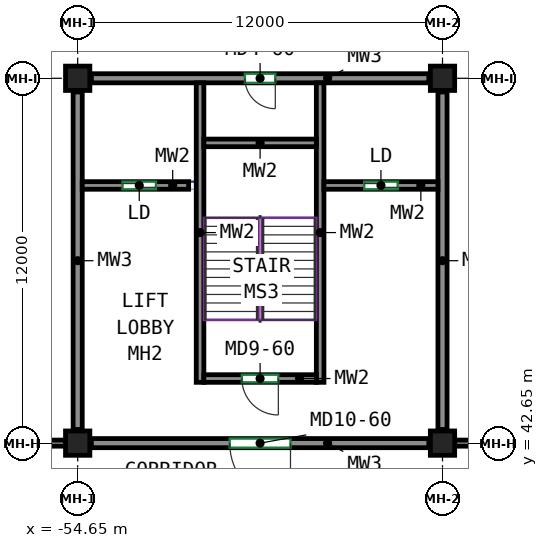
"""IFC4 building model, lengths in metres.
Left out: names, types, materials, properties, quantities, classifications, styles, units other than length and angle.
Written with IfcOpenShell. Run it as: python <this file> out.ifc"""

import sys

from ifc_helpers import new_model, si_unit, direction, frame, frame_2d, origin, origin_2d, place, context, subcontext, project, spatial, rectangle, extrude, source, transform, mapped, element, fill, save


model = new_model("IFC4")
c1 = context("Model", 3, precision=1e-05, world=origin(), true_north=direction((0.0, 1.0)))
c2 = subcontext(c1, "Body", "Model", "MODEL_VIEW")
j1 = project(units=[si_unit("LENGTHUNIT", "METRE"), si_unit("PLANEANGLEUNIT", "RADIAN")], contexts=[c1])
p1 = place(None, origin())
s1 = spatial("IfcSite", under=j1, at=p1, CompositionType="ELEMENT")
p2 = place(p1, origin())
s2 = spatial("IfcBuilding", under=s1, at=p2, CompositionType="ELEMENT")
p3 = place(p2, frame((0.0, 0.0, 13.5)))
s3 = spatial("IfcBuildingStorey", under=s2, at=p3, CompositionType="ELEMENT", Elevation=13.5)
m1 = source(origin(), c2, "Body", "SweptSolid", [
    extrude(rectangle(XDim=0.8, YDim=0.8, at=origin_2d()), origin(), (0.0, 0.0, 1.0), 4.1),
])
for number, where, z_axis, x_axis in (
    (1, (-54.65, 42.65, 0.0), (0.0, 0.0, 1.0), (1.0, 0.0, 0.0)),
    (2, (-54.65, 54.65, 0.0), (0.0, 0.0, 1.0), (1.0, 0.0, 0.0)),
    (3, (-42.65, 42.65, 0.0), (0.0, 0.0, 1.0), (1.0, 0.0, 0.0)),
    (4, (-42.65, 54.65, 0.0), (0.0, 0.0, 1.0), (1.0, 0.0, 0.0)),
):
    element("IfcColumn", number, at=place(p3, frame(where, z_axis=z_axis, x_axis=x_axis)), inside=s3, PredefinedType="COLUMN", context=c2, shape_type="MappedRepresentation", body=[
        mapped(m1, transform((0.0, 0.0, 0.0))),
    ])
m2 = source(origin(), c2, "Body", "SweptSolid", [
    extrude(rectangle(XDim=11.1, YDim=0.3, at=frame_2d((5.55, 0.0))), origin(), (0.0, 0.0, 1.0), 3.3),
])
p4 = place(p3, frame((-43.1, 54.65, 0.0), z_axis=(0.0, 0.0, 1.0), x_axis=(-1.0, 0.0, 0.0)))
e5 = element("IfcWall", 5, at=p4, inside=s3, PredefinedType="SHEAR", context=c2, shape_type="MappedRepresentation", body=[
    mapped(m2, transform((0.0, 0.0, 0.0))),
])
p5 = place(p4, frame((5.05, 0.0, 0.0)))
e6 = element("IfcOpeningElement", 6, at=p5, cuts=e5, PredefinedType="OPENING", context=c2, shape_type="SweptSolid", body=[
    extrude(rectangle(XDim=1.0, YDim=2.1, at=frame_2d((0.5, 1.05))), frame((0.0, 0.16, 0.0), z_axis=(0.0, -1.0, 0.0), x_axis=(1.0, 0.0, 0.0)), (0.0, 0.0, 1.0), 0.32),
])
p6 = place(p3, frame((-43.1, 42.65, 0.0), z_axis=(0.0, 0.0, 1.0), x_axis=(-1.0, 0.0, 0.0)))
e7 = element("IfcWall", 7, at=p6, inside=s3, PredefinedType="SHEAR", context=c2, shape_type="MappedRepresentation", body=[
    mapped(m2, transform((0.0, 0.0, 0.0))),
])
p7 = place(p6, frame((4.55, 0.0, 0.0)))
e8 = element("IfcOpeningElement", 8, at=p7, cuts=e7, PredefinedType="OPENING", context=c2, shape_type="SweptSolid", body=[
    extrude(rectangle(XDim=2.0, YDim=2.4, at=frame_2d((1.0, 1.2))), frame((0.0, 0.16, 0.0), z_axis=(0.0, -1.0, 0.0), x_axis=(1.0, 0.0, 0.0)), (0.0, 0.0, 1.0), 0.32),
])
for number, where, z_axis, x_axis in (
    (9, (-42.65, 54.2, 0.0), (0.0, 0.0, 1.0), (0.0, -1.0, 0.0)),
    (10, (-54.65, 54.2, 0.0), (0.0, 0.0, 1.0), (0.0, -1.0, 0.0)),
):
    element("IfcWall", number, at=place(p3, frame(where, z_axis=z_axis, x_axis=x_axis)), inside=s3, PredefinedType="SHEAR", context=c2, shape_type="MappedRepresentation", body=[
        mapped(m2, transform((0.0, 0.0, 0.0))),
    ])
m3 = source(origin(), c2, "Body", "SweptSolid", [
    extrude(rectangle(XDim=9.85, YDim=0.25, at=frame_2d((4.925, 0.0))), origin(), (0.0, 0.0, 1.0), 4.1),
])
for number, where, z_axis, x_axis in (
    (11, (-46.675, 54.5, 0.0), (0.0, 0.0, 1.0), (0.0, -1.0, 0.0)),
    (12, (-50.625, 54.5, 0.0), (0.0, 0.0, 1.0), (0.0, -1.0, 0.0)),
):
    element("IfcWall", number, at=place(p3, frame(where, z_axis=z_axis, x_axis=x_axis)), inside=s3, PredefinedType="SHEAR", context=c2, shape_type="MappedRepresentation", body=[
        mapped(m3, transform((0.0, 0.0, 0.0))),
    ])
m4 = source(origin(), c2, "Body", "SweptSolid", [
    extrude(rectangle(XDim=3.7, YDim=0.25, at=frame_2d((1.85, 0.0))), origin(), (0.0, 0.0, 1.0), 4.1),
])
p8 = place(p3, frame((-46.8, 52.525, 0.0), z_axis=(0.0, 0.0, 1.0), x_axis=(-1.0, 0.0, 0.0)))
e13 = element("IfcWall", 13, at=p8, inside=s3, PredefinedType="SHEAR", context=c2, shape_type="MappedRepresentation", body=[
    mapped(m4, transform((0.0, 0.0, 0.0))),
])
p9 = place(p3, frame((-46.8, 44.775, 0.0), z_axis=(0.0, 0.0, 1.0), x_axis=(-1.0, 0.0, 0.0)))
e14 = element("IfcWall", 14, at=p9, inside=s3, PredefinedType="SHEAR", context=c2, shape_type="MappedRepresentation", body=[
    mapped(m4, transform((0.0, 0.0, 0.0))),
])
p10 = place(p9, frame((1.25, 0.0, 0.0)))
e15 = element("IfcOpeningElement", 15, at=p10, cuts=e14, PredefinedType="OPENING", context=c2, shape_type="SweptSolid", body=[
    extrude(rectangle(XDim=1.2, YDim=2.1, at=frame_2d((0.6, 1.05))), frame((0.0, 0.135, 0.0), z_axis=(0.0, -1.0, 0.0), x_axis=(1.0, 0.0, 0.0)), (0.0, 0.0, 1.0), 0.27),
])
m5 = source(origin(), c2, "Body", "SweptSolid", [
    extrude(rectangle(XDim=3.75, YDim=0.25, at=frame_2d((1.875, 0.0))), origin(), (0.0, 0.0, 1.0), 4.1),
])
p11 = place(p3, frame((-42.8, 51.125, 0.0), z_axis=(0.0, 0.0, 1.0), x_axis=(-1.0, 0.0, 0.0)))
e16 = element("IfcWall", 16, at=p11, inside=s3, PredefinedType="SHEAR", context=c2, shape_type="MappedRepresentation", body=[
    mapped(m5, transform((0.0, 0.0, 0.0))),
])
p12 = place(p11, frame((1.325, 0.0, 0.0)))
e17 = element("IfcOpeningElement", 17, at=p12, cuts=e16, PredefinedType="OPENING", context=c2, shape_type="SweptSolid", body=[
    extrude(rectangle(XDim=1.1, YDim=2.1, at=frame_2d((0.55, 1.05))), frame((0.0, 0.135, 0.0), z_axis=(0.0, -1.0, 0.0), x_axis=(1.0, 0.0, 0.0)), (0.0, 0.0, 1.0), 0.27),
])
m6 = source(origin(), c2, "Body", "SweptSolid", [
    extrude(rectangle(XDim=3.5, YDim=0.25, at=frame_2d((1.75, 0.0))), origin(), (0.0, 0.0, 1.0), 4.1),
])
p13 = place(p3, frame((-51.0, 51.125, 0.0), z_axis=(0.0, 0.0, 1.0), x_axis=(-1.0, 0.0, 0.0)))
e18 = element("IfcWall", 18, at=p13, inside=s3, PredefinedType="SHEAR", context=c2, shape_type="MappedRepresentation", body=[
    mapped(m6, transform((0.0, 0.0, 0.0))),
])
p14 = place(p13, frame((1.075, 0.0, 0.0)))
e19 = element("IfcOpeningElement", 19, at=p14, cuts=e18, PredefinedType="OPENING", context=c2, shape_type="SweptSolid", body=[
    extrude(rectangle(XDim=1.1, YDim=2.1, at=frame_2d((0.55, 1.05))), frame((0.0, 0.135, 0.0), z_axis=(0.0, -1.0, 0.0), x_axis=(1.0, 0.0, 0.0)), (0.0, 0.0, 1.0), 0.27),
])
m7 = source(origin(), c2, "Body", "SweptSolid", [
    extrude(rectangle(XDim=1.8, YDim=0.2, at=frame_2d((0.9, 0.0))), origin(), (0.0, 0.0, 1.0), 4.1),
])
p15 = place(p3, frame((-56.85, 42.65, 0.0), z_axis=(0.0, 0.0, 1.0), x_axis=(1.0, 0.0, 0.0)))
e20 = element("IfcWall", 20, at=p15, inside=s3, PredefinedType="PARTITIONING", context=c2, shape_type="MappedRepresentation", body=[
    mapped(m7, transform((0.0, 0.0, 0.0))),
])
m8 = source(origin(), c2, "Body", "SweptSolid", [
    extrude(rectangle(XDim=11.2, YDim=0.2, at=frame_2d((5.6, 0.0))), origin(), (0.0, 0.0, 1.0), 3.3),
])
p16 = place(p3, frame((-42.25, 42.65, 0.0), z_axis=(0.0, 0.0, 1.0), x_axis=(1.0, 0.0, 0.0)))
e21 = element("IfcWall", 21, at=p16, inside=s3, PredefinedType="PARTITIONING", context=c2, shape_type="MappedRepresentation", body=[
    mapped(m8, transform((0.0, 0.0, 0.0))),
])
p17 = place(p16, frame((4.4, 0.0, 0.0)))
e22 = element("IfcOpeningElement", 22, at=p17, cuts=e21, PredefinedType="OPENING", context=c2, shape_type="SweptSolid", body=[
    extrude(rectangle(XDim=2.4, YDim=2.4, at=frame_2d((1.2, 1.2))), frame((0.0, 0.11, 0.0), z_axis=(0.0, -1.0, 0.0), x_axis=(1.0, 0.0, 0.0)), (0.0, 0.0, 1.0), 0.22),
])
p18 = place(p10, origin())
e23 = element("IfcDoor", 23, at=p18, inside=s3, OperationType="DOUBLE_DOOR_SINGLE_SWING", PredefinedType="DOOR", context=c2, shape_type="SweptSolid", body=[
    extrude(rectangle(XDim=1.2, YDim=2.1, at=frame_2d((0.6, 1.05))), frame((0.0, 0.025, 0.0), z_axis=(0.0, -1.0, 0.0), x_axis=(1.0, 0.0, 0.0)), (0.0, 0.0, 1.0), 0.05),
])
fill(e15, e23)
p19 = place(p7, origin())
e24 = element("IfcDoor", 24, at=p19, inside=s3, OperationType="DOUBLE_DOOR_SINGLE_SWING", PredefinedType="DOOR", context=c2, shape_type="SweptSolid", body=[
    extrude(rectangle(XDim=2.0, YDim=2.4, at=frame_2d((1.0, 1.2))), frame((0.0, 0.025, 0.0), z_axis=(0.0, -1.0, 0.0), x_axis=(1.0, 0.0, 0.0)), (0.0, 0.0, 1.0), 0.05),
])
fill(e8, e24)
p20 = place(p12, origin())
e25 = element("IfcDoor", 25, at=p20, inside=s3, OperationType="SLIDING_TO_LEFT", PredefinedType="DOOR", context=c2, shape_type="SweptSolid", body=[
    extrude(rectangle(XDim=1.1, YDim=2.1, at=frame_2d((0.55, 1.05))), frame((0.0, 0.025, 0.0), z_axis=(0.0, -1.0, 0.0), x_axis=(1.0, 0.0, 0.0)), (0.0, 0.0, 1.0), 0.05),
])
fill(e17, e25)
p21 = place(p14, origin())
e26 = element("IfcDoor", 26, at=p21, inside=s3, OperationType="SLIDING_TO_LEFT", PredefinedType="DOOR", context=c2, shape_type="SweptSolid", body=[
    extrude(rectangle(XDim=1.1, YDim=2.1, at=frame_2d((0.55, 1.05))), frame((0.0, 0.025, 0.0), z_axis=(0.0, -1.0, 0.0), x_axis=(1.0, 0.0, 0.0)), (0.0, 0.0, 1.0), 0.05),
])
fill(e19, e26)
p22 = place(p5, origin())
e27 = element("IfcDoor", 27, at=p22, inside=s3, OperationType="SINGLE_SWING_LEFT", PredefinedType="DOOR", context=c2, shape_type="SweptSolid", body=[
    extrude(rectangle(XDim=1.0, YDim=2.1, at=frame_2d((0.5, 1.05))), frame((0.0, 0.025, 0.0), z_axis=(0.0, -1.0, 0.0), x_axis=(1.0, 0.0, 0.0)), (0.0, 0.0, 1.0), 0.05),
])
fill(e6, e27)
save(model, sys.argv[1])
